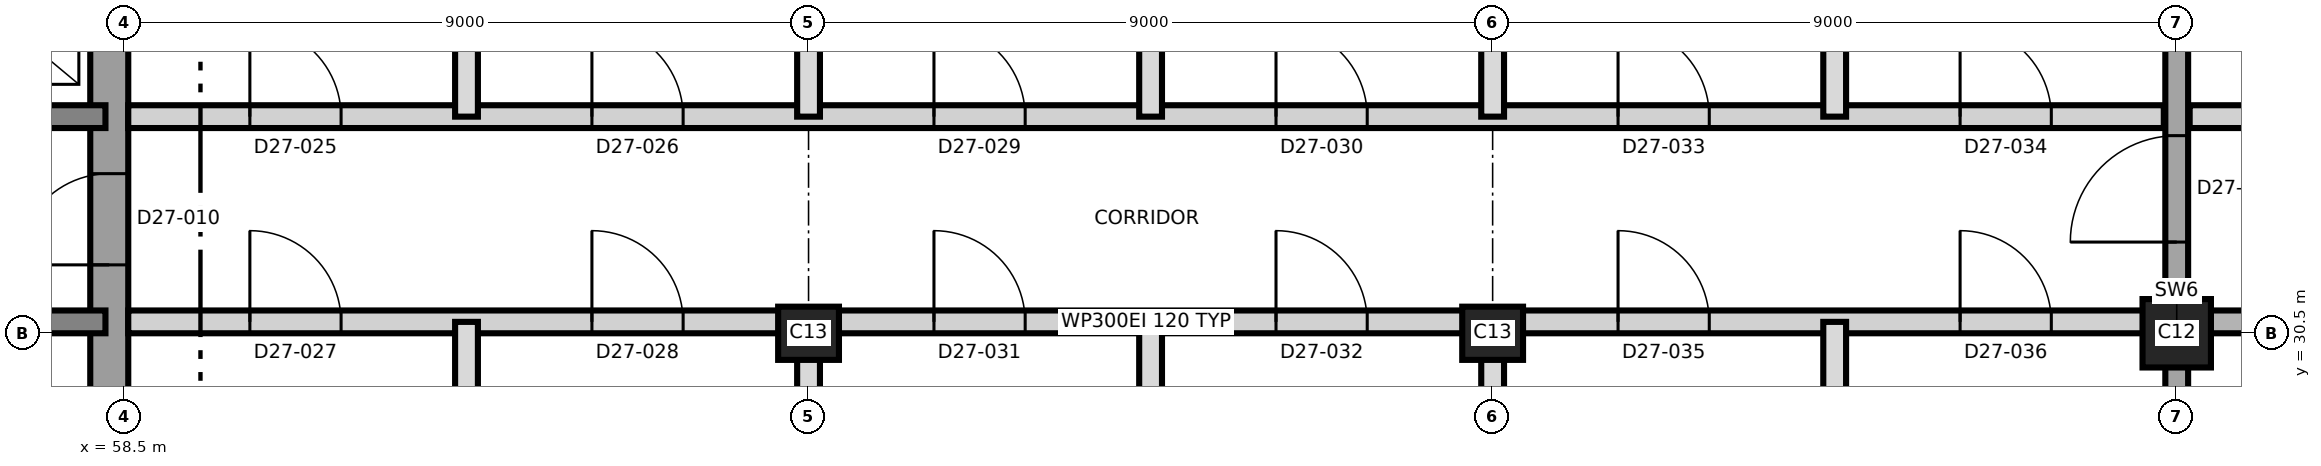
"""IFC4 building model, lengths in metres.
Left out: names, types, materials, properties, quantities, classifications, styles, units other than length and angle.
Written with IfcOpenShell. Run it as: python <this file> out.ifc"""

import sys

from ifc_helpers import new_model, si_unit, direction, frame, frame_2d, origin, origin_2d, place, context, subcontext, project, spatial, rectangle, extrude, element, fill, save


model = new_model("IFC4")
c1 = context("Model", 3, precision=1e-05, world=origin(), true_north=direction((0.0, 1.0)))
c2 = subcontext(c1, "Body", "Model", "MODEL_VIEW")
j1 = project(units=[si_unit("LENGTHUNIT", "METRE"), si_unit("PLANEANGLEUNIT", "RADIAN")], contexts=[c1])
p1 = place(None, origin())
s1 = spatial("IfcSite", under=j1, at=p1, CompositionType="ELEMENT")
p2 = place(p1, origin())
s2 = spatial("IfcBuilding", under=s1, at=p2, CompositionType="ELEMENT")
p3 = place(p2, frame((0.0, 0.0, 243.9)))
s3 = spatial("IfcBuildingStorey", under=s2, at=p3, CompositionType="ELEMENT", Elevation=243.9)
p4 = place(p3, frame((58.3, 21.25, 0.0), z_axis=(0.0, 0.0, 1.0), x_axis=(0.0, 1.0, 0.0)))
e1 = element("IfcWall", 1, at=p4, inside=s3, PredefinedType="SHEAR", context=c2, shape_type="SweptSolid", body=[
    extrude(rectangle(XDim=18.5, YDim=0.5, at=frame_2d((9.25, 0.0))), origin(), (0.0, 0.0, 1.0), 5.5),
])
p5 = place(p4, frame((10.15, 0.0, 0.0)))
e2 = element("IfcOpeningElement", 2, at=p5, cuts=e1, PredefinedType="OPENING", context=c2, shape_type="SweptSolid", body=[
    extrude(rectangle(XDim=1.2, YDim=2.1, at=frame_2d((0.6, 1.05))), frame((0.0, 0.26, 0.0), z_axis=(0.0, -1.0, 0.0), x_axis=(1.0, 0.0, 0.0)), (0.0, 0.0, 1.0), 0.52),
])
p6 = place(p3, frame((31.75, 30.65, 0.0), z_axis=(0.0, 0.0, 1.0), x_axis=(1.0, 0.0, 0.0)))
e3 = element("IfcWall", 3, at=p6, inside=s3, PredefinedType="SHEAR", context=c2, shape_type="SweptSolid", body=[
    extrude(rectangle(XDim=26.5, YDim=0.3, at=frame_2d((13.25, 0.0))), origin(), (0.0, 0.0, 1.0), 5.5),
])
p7 = place(p6, frame((24.75, 0.0, 0.0)))
e4 = element("IfcOpeningElement", 4, at=p7, cuts=e3, PredefinedType="OPENING", context=c2, shape_type="SweptSolid", body=[
    extrude(rectangle(XDim=1.0, YDim=2.1, at=frame_2d((0.5, 1.05))), frame((0.0, 0.16, 0.0), z_axis=(0.0, -1.0, 0.0), x_axis=(1.0, 0.0, 0.0)), (0.0, 0.0, 1.0), 0.32),
])
p8 = place(p3, frame((31.75, 33.35, 0.0), z_axis=(0.0, 0.0, 1.0), x_axis=(1.0, 0.0, 0.0)))
e5 = element("IfcWall", 5, at=p8, inside=s3, PredefinedType="SHEAR", context=c2, shape_type="SweptSolid", body=[
    extrude(rectangle(XDim=26.5, YDim=0.3, at=frame_2d((13.25, 0.0))), origin(), (0.0, 0.0, 1.0), 5.5),
])
p9 = place(p8, frame((13.9, 0.0, 0.0)))
e6 = element("IfcOpeningElement", 6, at=p9, cuts=e5, PredefinedType="OPENING", context=c2, shape_type="SweptSolid", body=[
    extrude(rectangle(XDim=1.4, YDim=2.1, at=frame_2d((0.7, 1.05))), frame((0.0, 0.16, 0.0), z_axis=(0.0, -1.0, 0.0), x_axis=(1.0, 0.0, 0.0)), (0.0, 0.0, 1.0), 0.32),
])
p10 = place(p8, frame((5.375, 0.0, 0.0)))
e7 = element("IfcOpeningElement", 7, at=p10, cuts=e5, PredefinedType="OPENING", context=c2, shape_type="SweptSolid", body=[
    extrude(rectangle(XDim=1.2, YDim=2.1, at=frame_2d((0.6, 1.05))), frame((0.0, 0.16, 0.0), z_axis=(0.0, -1.0, 0.0), x_axis=(1.0, 0.0, 0.0)), (0.0, 0.0, 1.0), 0.32),
])
p11 = place(p8, frame((19.925, 0.0, 0.0)))
e8 = element("IfcOpeningElement", 8, at=p11, cuts=e5, PredefinedType="OPENING", context=c2, shape_type="SweptSolid", body=[
    extrude(rectangle(XDim=1.2, YDim=2.1, at=frame_2d((0.6, 1.05))), frame((0.0, 0.16, 0.0), z_axis=(0.0, -1.0, 0.0), x_axis=(1.0, 0.0, 0.0)), (0.0, 0.0, 1.0), 0.32),
])
for number, where, z_axis, x_axis in (
    (9, (67.5, 30.5, 0.0), (0.0, 0.0, 1.0), (1.0, 0.0, 0.0)),
    (10, (76.5, 30.5, 0.0), (0.0, 0.0, 1.0), (1.0, 0.0, 0.0)),
):
    element("IfcColumn", number, at=place(p3, frame(where, z_axis=z_axis, x_axis=x_axis)), inside=s3, PredefinedType="COLUMN", context=c2, shape_type="SweptSolid", body=[
        extrude(rectangle(XDim=0.8, YDim=0.7, at=origin_2d()), origin(), (0.0, 0.0, 1.0), 5.5),
    ])
p12 = place(p3, frame((85.5, 30.5, 0.0), z_axis=(0.0, 0.0, 1.0), x_axis=(1.0, 0.0, 0.0)))
e11 = element("IfcColumn", 11, at=p12, inside=s3, PredefinedType="COLUMN", context=c2, shape_type="SweptSolid", body=[
    extrude(rectangle(XDim=0.9, YDim=0.9, at=origin_2d()), origin(), (0.0, 0.0, 1.0), 5.5),
])
p13 = place(p3, frame((85.5, 20.35, 0.0), z_axis=(0.0, 0.0, 1.0), x_axis=(0.0, 1.0, 0.0)))
e12 = element("IfcWall", 12, at=p13, inside=s3, PredefinedType="SHEAR", context=c2, shape_type="SweptSolid", body=[
    extrude(rectangle(XDim=20.3, YDim=0.3, at=frame_2d((10.15, 0.0))), origin(), (0.0, 0.0, 1.0), 5.5),
])
p14 = place(p13, frame((11.35, 0.0, 0.0)))
e13 = element("IfcOpeningElement", 13, at=p14, cuts=e12, PredefinedType="OPENING", context=c2, shape_type="SweptSolid", body=[
    extrude(rectangle(XDim=1.4, YDim=2.1, at=frame_2d((0.7, 1.05))), frame((0.0, 0.16, 0.0), z_axis=(0.0, -1.0, 0.0), x_axis=(1.0, 0.0, 0.0)), (0.0, 0.0, 1.0), 0.32),
])
p15 = place(p3, frame((58.55, 30.65, 0.0), z_axis=(0.0, 0.0, 1.0), x_axis=(1.0, 0.0, 0.0)))
e14 = element("IfcWall", 14, at=p15, inside=s3, PredefinedType="PARTITIONING", context=c2, shape_type="SweptSolid", body=[
    extrude(rectangle(XDim=26.78, YDim=0.3, at=frame_2d((13.39, 0.0))), origin(), (0.0, 0.0, 1.0), 5.2),
])
p16 = place(p15, frame((1.6, 0.0, 0.0)))
e15 = element("IfcOpeningElement", 15, at=p16, cuts=e14, PredefinedType="OPENING", context=c2, shape_type="SweptSolid", body=[
    extrude(rectangle(XDim=1.2, YDim=2.1, at=frame_2d((0.6, 1.05))), frame((0.0, 0.16, 0.0), z_axis=(0.0, -1.0, 0.0), x_axis=(1.0, 0.0, 0.0)), (0.0, 0.0, 1.0), 0.32),
])
p17 = place(p15, frame((6.1, 0.0, 0.0)))
e16 = element("IfcOpeningElement", 16, at=p17, cuts=e14, PredefinedType="OPENING", context=c2, shape_type="SweptSolid", body=[
    extrude(rectangle(XDim=1.2, YDim=2.1, at=frame_2d((0.6, 1.05))), frame((0.0, 0.16, 0.0), z_axis=(0.0, -1.0, 0.0), x_axis=(1.0, 0.0, 0.0)), (0.0, 0.0, 1.0), 0.32),
])
p18 = place(p15, frame((10.6, 0.0, 0.0)))
e17 = element("IfcOpeningElement", 17, at=p18, cuts=e14, PredefinedType="OPENING", context=c2, shape_type="SweptSolid", body=[
    extrude(rectangle(XDim=1.2, YDim=2.1, at=frame_2d((0.6, 1.05))), frame((0.0, 0.16, 0.0), z_axis=(0.0, -1.0, 0.0), x_axis=(1.0, 0.0, 0.0)), (0.0, 0.0, 1.0), 0.32),
])
p19 = place(p15, frame((15.1, 0.0, 0.0)))
e18 = element("IfcOpeningElement", 18, at=p19, cuts=e14, PredefinedType="OPENING", context=c2, shape_type="SweptSolid", body=[
    extrude(rectangle(XDim=1.2, YDim=2.1, at=frame_2d((0.6, 1.05))), frame((0.0, 0.16, 0.0), z_axis=(0.0, -1.0, 0.0), x_axis=(1.0, 0.0, 0.0)), (0.0, 0.0, 1.0), 0.32),
])
p20 = place(p15, frame((19.6, 0.0, 0.0)))
e19 = element("IfcOpeningElement", 19, at=p20, cuts=e14, PredefinedType="OPENING", context=c2, shape_type="SweptSolid", body=[
    extrude(rectangle(XDim=1.2, YDim=2.1, at=frame_2d((0.6, 1.05))), frame((0.0, 0.16, 0.0), z_axis=(0.0, -1.0, 0.0), x_axis=(1.0, 0.0, 0.0)), (0.0, 0.0, 1.0), 0.32),
])
p21 = place(p15, frame((24.1, 0.0, 0.0)))
e20 = element("IfcOpeningElement", 20, at=p21, cuts=e14, PredefinedType="OPENING", context=c2, shape_type="SweptSolid", body=[
    extrude(rectangle(XDim=1.2, YDim=2.1, at=frame_2d((0.6, 1.05))), frame((0.0, 0.16, 0.0), z_axis=(0.0, -1.0, 0.0), x_axis=(1.0, 0.0, 0.0)), (0.0, 0.0, 1.0), 0.32),
])
p22 = place(p3, frame((85.67, 30.65, 0.0), z_axis=(0.0, 0.0, 1.0), x_axis=(1.0, 0.0, 0.0)))
e21 = element("IfcWall", 21, at=p22, inside=s3, PredefinedType="SHEAR", context=c2, shape_type="SweptSolid", body=[
    extrude(rectangle(XDim=9.58, YDim=0.3, at=frame_2d((4.79, 0.0))), origin(), (0.0, 0.0, 1.0), 5.2),
])
p23 = place(p22, frame((2.08, 0.0, 0.0)))
e22 = element("IfcOpeningElement", 22, at=p23, cuts=e21, PredefinedType="OPENING", context=c2, shape_type="SweptSolid", body=[
    extrude(rectangle(XDim=1.2, YDim=2.1, at=frame_2d((0.6, 1.05))), frame((0.0, 0.16, 0.0), z_axis=(0.0, -1.0, 0.0), x_axis=(1.0, 0.0, 0.0)), (0.0, 0.0, 1.0), 0.32),
])
p24 = place(p22, frame((5.63, 0.0, 0.0)))
e23 = element("IfcOpeningElement", 23, at=p24, cuts=e21, PredefinedType="OPENING", context=c2, shape_type="SweptSolid", body=[
    extrude(rectangle(XDim=1.0, YDim=2.1, at=frame_2d((0.5, 1.05))), frame((0.0, 0.16, 0.0), z_axis=(0.0, -1.0, 0.0), x_axis=(1.0, 0.0, 0.0)), (0.0, 0.0, 1.0), 0.32),
])
p25 = place(p3, frame((58.55, 33.35, 0.0), z_axis=(0.0, 0.0, 1.0), x_axis=(1.0, 0.0, 0.0)))
e24 = element("IfcWall", 24, at=p25, inside=s3, PredefinedType="PARTITIONING", context=c2, shape_type="SweptSolid", body=[
    extrude(rectangle(XDim=26.78, YDim=0.3, at=frame_2d((13.39, 0.0))), origin(), (0.0, 0.0, 1.0), 5.2),
])
p26 = place(p25, frame((1.6, 0.0, 0.0)))
e25 = element("IfcOpeningElement", 25, at=p26, cuts=e24, PredefinedType="OPENING", context=c2, shape_type="SweptSolid", body=[
    extrude(rectangle(XDim=1.2, YDim=2.1, at=frame_2d((0.6, 1.05))), frame((0.0, 0.16, 0.0), z_axis=(0.0, -1.0, 0.0), x_axis=(1.0, 0.0, 0.0)), (0.0, 0.0, 1.0), 0.32),
])
p27 = place(p25, frame((6.1, 0.0, 0.0)))
e26 = element("IfcOpeningElement", 26, at=p27, cuts=e24, PredefinedType="OPENING", context=c2, shape_type="SweptSolid", body=[
    extrude(rectangle(XDim=1.2, YDim=2.1, at=frame_2d((0.6, 1.05))), frame((0.0, 0.16, 0.0), z_axis=(0.0, -1.0, 0.0), x_axis=(1.0, 0.0, 0.0)), (0.0, 0.0, 1.0), 0.32),
])
p28 = place(p25, frame((10.6, 0.0, 0.0)))
e27 = element("IfcOpeningElement", 27, at=p28, cuts=e24, PredefinedType="OPENING", context=c2, shape_type="SweptSolid", body=[
    extrude(rectangle(XDim=1.2, YDim=2.1, at=frame_2d((0.6, 1.05))), frame((0.0, 0.16, 0.0), z_axis=(0.0, -1.0, 0.0), x_axis=(1.0, 0.0, 0.0)), (0.0, 0.0, 1.0), 0.32),
])
p29 = place(p25, frame((15.1, 0.0, 0.0)))
e28 = element("IfcOpeningElement", 28, at=p29, cuts=e24, PredefinedType="OPENING", context=c2, shape_type="SweptSolid", body=[
    extrude(rectangle(XDim=1.2, YDim=2.1, at=frame_2d((0.6, 1.05))), frame((0.0, 0.16, 0.0), z_axis=(0.0, -1.0, 0.0), x_axis=(1.0, 0.0, 0.0)), (0.0, 0.0, 1.0), 0.32),
])
p30 = place(p25, frame((19.6, 0.0, 0.0)))
e29 = element("IfcOpeningElement", 29, at=p30, cuts=e24, PredefinedType="OPENING", context=c2, shape_type="SweptSolid", body=[
    extrude(rectangle(XDim=1.2, YDim=2.1, at=frame_2d((0.6, 1.05))), frame((0.0, 0.16, 0.0), z_axis=(0.0, -1.0, 0.0), x_axis=(1.0, 0.0, 0.0)), (0.0, 0.0, 1.0), 0.32),
])
p31 = place(p25, frame((24.1, 0.0, 0.0)))
e30 = element("IfcOpeningElement", 30, at=p31, cuts=e24, PredefinedType="OPENING", context=c2, shape_type="SweptSolid", body=[
    extrude(rectangle(XDim=1.2, YDim=2.1, at=frame_2d((0.6, 1.05))), frame((0.0, 0.16, 0.0), z_axis=(0.0, -1.0, 0.0), x_axis=(1.0, 0.0, 0.0)), (0.0, 0.0, 1.0), 0.32),
])
p32 = place(p3, frame((85.67, 33.35, 0.0), z_axis=(0.0, 0.0, 1.0), x_axis=(1.0, 0.0, 0.0)))
e31 = element("IfcWall", 31, at=p32, inside=s3, PredefinedType="PARTITIONING", context=c2, shape_type="SweptSolid", body=[
    extrude(rectangle(XDim=9.705, YDim=0.3, at=frame_2d((4.853, 0.0))), origin(), (0.0, 0.0, 1.0), 5.2),
])
p33 = place(p32, frame((2.73, 0.0, 0.0)))
e32 = element("IfcOpeningElement", 32, at=p33, cuts=e31, PredefinedType="OPENING", context=c2, shape_type="SweptSolid", body=[
    extrude(rectangle(XDim=1.2, YDim=2.1, at=frame_2d((0.6, 1.05))), frame((0.0, 0.16, 0.0), z_axis=(0.0, -1.0, 0.0), x_axis=(1.0, 0.0, 0.0)), (0.0, 0.0, 1.0), 0.32),
])
p34 = place(p3, frame((63.0, 21.9, 0.0), z_axis=(0.0, 0.0, 1.0), x_axis=(0.0, 1.0, 0.0)))
e33 = element("IfcWall", 33, at=p34, inside=s3, PredefinedType="PARTITIONING", context=c2, shape_type="SweptSolid", body=[
    extrude(rectangle(XDim=8.75, YDim=0.3, at=frame_2d((4.375, 0.0))), origin(), (0.0, 0.0, 1.0), 5.2),
])
p35 = place(p3, frame((63.0, 33.35, 0.0), z_axis=(0.0, 0.0, 1.0), x_axis=(0.0, 1.0, 0.0)))
e34 = element("IfcWall", 34, at=p35, inside=s3, PredefinedType="PARTITIONING", context=c2, shape_type="SweptSolid", body=[
    extrude(rectangle(XDim=5.75, YDim=0.3, at=frame_2d((2.875, 0.0))), origin(), (0.0, 0.0, 1.0), 5.2),
])
p36 = place(p3, frame((67.5, 21.9, 0.0), z_axis=(0.0, 0.0, 1.0), x_axis=(0.0, 1.0, 0.0)))
e35 = element("IfcWall", 35, at=p36, inside=s3, PredefinedType="PARTITIONING", context=c2, shape_type="SweptSolid", body=[
    extrude(rectangle(XDim=8.75, YDim=0.3, at=frame_2d((4.375, 0.0))), origin(), (0.0, 0.0, 1.0), 5.2),
])
p37 = place(p3, frame((67.5, 33.35, 0.0), z_axis=(0.0, 0.0, 1.0), x_axis=(0.0, 1.0, 0.0)))
e36 = element("IfcWall", 36, at=p37, inside=s3, PredefinedType="PARTITIONING", context=c2, shape_type="SweptSolid", body=[
    extrude(rectangle(XDim=5.75, YDim=0.3, at=frame_2d((2.875, 0.0))), origin(), (0.0, 0.0, 1.0), 5.2),
])
p38 = place(p3, frame((72.0, 21.9, 0.0), z_axis=(0.0, 0.0, 1.0), x_axis=(0.0, 1.0, 0.0)))
e37 = element("IfcWall", 37, at=p38, inside=s3, PredefinedType="PARTITIONING", context=c2, shape_type="SweptSolid", body=[
    extrude(rectangle(XDim=8.75, YDim=0.3, at=frame_2d((4.375, 0.0))), origin(), (0.0, 0.0, 1.0), 5.2),
])
p39 = place(p3, frame((72.0, 33.35, 0.0), z_axis=(0.0, 0.0, 1.0), x_axis=(0.0, 1.0, 0.0)))
e38 = element("IfcWall", 38, at=p39, inside=s3, PredefinedType="PARTITIONING", context=c2, shape_type="SweptSolid", body=[
    extrude(rectangle(XDim=5.75, YDim=0.3, at=frame_2d((2.875, 0.0))), origin(), (0.0, 0.0, 1.0), 5.2),
])
p40 = place(p3, frame((76.5, 21.9, 0.0), z_axis=(0.0, 0.0, 1.0), x_axis=(0.0, 1.0, 0.0)))
e39 = element("IfcWall", 39, at=p40, inside=s3, PredefinedType="PARTITIONING", context=c2, shape_type="SweptSolid", body=[
    extrude(rectangle(XDim=8.75, YDim=0.3, at=frame_2d((4.375, 0.0))), origin(), (0.0, 0.0, 1.0), 5.2),
])
p41 = place(p3, frame((76.5, 33.35, 0.0), z_axis=(0.0, 0.0, 1.0), x_axis=(0.0, 1.0, 0.0)))
e40 = element("IfcWall", 40, at=p41, inside=s3, PredefinedType="PARTITIONING", context=c2, shape_type="SweptSolid", body=[
    extrude(rectangle(XDim=5.75, YDim=0.3, at=frame_2d((2.875, 0.0))), origin(), (0.0, 0.0, 1.0), 5.2),
])
p42 = place(p3, frame((81.0, 21.9, 0.0), z_axis=(0.0, 0.0, 1.0), x_axis=(0.0, 1.0, 0.0)))
e41 = element("IfcWall", 41, at=p42, inside=s3, PredefinedType="PARTITIONING", context=c2, shape_type="SweptSolid", body=[
    extrude(rectangle(XDim=8.75, YDim=0.3, at=frame_2d((4.375, 0.0))), origin(), (0.0, 0.0, 1.0), 5.2),
])
p43 = place(p3, frame((81.0, 33.35, 0.0), z_axis=(0.0, 0.0, 1.0), x_axis=(0.0, 1.0, 0.0)))
e42 = element("IfcWall", 42, at=p43, inside=s3, PredefinedType="PARTITIONING", context=c2, shape_type="SweptSolid", body=[
    extrude(rectangle(XDim=5.75, YDim=0.3, at=frame_2d((2.875, 0.0))), origin(), (0.0, 0.0, 1.0), 5.2),
])
p44 = place(p5, origin())
e43 = element("IfcDoor", 43, at=p44, inside=s3, OperationType="SINGLE_SWING_LEFT", PredefinedType="DOOR", context=c2, shape_type="SweptSolid", body=[
    extrude(rectangle(XDim=1.2, YDim=2.1, at=frame_2d((0.6, 1.05))), frame((0.0, 0.025, 0.0), z_axis=(0.0, -1.0, 0.0), x_axis=(1.0, 0.0, 0.0)), (0.0, 0.0, 1.0), 0.05),
])
fill(e2, e43)
p45 = place(p26, origin())
e44 = element("IfcDoor", 44, at=p45, inside=s3, OperationType="SINGLE_SWING_LEFT", PredefinedType="DOOR", context=c2, shape_type="SweptSolid", body=[
    extrude(rectangle(XDim=1.2, YDim=2.1, at=frame_2d((0.6, 1.05))), frame((0.0, 0.025, 0.0), z_axis=(0.0, -1.0, 0.0), x_axis=(1.0, 0.0, 0.0)), (0.0, 0.0, 1.0), 0.05),
])
fill(e25, e44)
p46 = place(p27, origin())
e45 = element("IfcDoor", 45, at=p46, inside=s3, OperationType="SINGLE_SWING_LEFT", PredefinedType="DOOR", context=c2, shape_type="SweptSolid", body=[
    extrude(rectangle(XDim=1.2, YDim=2.1, at=frame_2d((0.6, 1.05))), frame((0.0, 0.025, 0.0), z_axis=(0.0, -1.0, 0.0), x_axis=(1.0, 0.0, 0.0)), (0.0, 0.0, 1.0), 0.05),
])
fill(e26, e45)
p47 = place(p16, origin())
e46 = element("IfcDoor", 46, at=p47, inside=s3, OperationType="SINGLE_SWING_RIGHT", PredefinedType="DOOR", context=c2, shape_type="SweptSolid", body=[
    extrude(rectangle(XDim=1.2, YDim=2.1, at=frame_2d((0.6, 1.05))), frame((0.0, 0.025, 0.0), z_axis=(0.0, -1.0, 0.0), x_axis=(1.0, 0.0, 0.0)), (0.0, 0.0, 1.0), 0.05),
])
fill(e15, e46)
p48 = place(p17, origin())
e47 = element("IfcDoor", 47, at=p48, inside=s3, OperationType="SINGLE_SWING_LEFT", PredefinedType="DOOR", context=c2, shape_type="SweptSolid", body=[
    extrude(rectangle(XDim=1.2, YDim=2.1, at=frame_2d((0.6, 1.05))), frame((0.0, 0.025, 0.0), z_axis=(0.0, -1.0, 0.0), x_axis=(1.0, 0.0, 0.0)), (0.0, 0.0, 1.0), 0.05),
])
fill(e16, e47)
p49 = place(p28, origin())
e48 = element("IfcDoor", 48, at=p49, inside=s3, OperationType="SINGLE_SWING_LEFT", PredefinedType="DOOR", context=c2, shape_type="SweptSolid", body=[
    extrude(rectangle(XDim=1.2, YDim=2.1, at=frame_2d((0.6, 1.05))), frame((0.0, 0.025, 0.0), z_axis=(0.0, -1.0, 0.0), x_axis=(1.0, 0.0, 0.0)), (0.0, 0.0, 1.0), 0.05),
])
fill(e27, e48)
p50 = place(p29, origin())
e49 = element("IfcDoor", 49, at=p50, inside=s3, OperationType="SINGLE_SWING_RIGHT", PredefinedType="DOOR", context=c2, shape_type="SweptSolid", body=[
    extrude(rectangle(XDim=1.2, YDim=2.1, at=frame_2d((0.6, 1.05))), frame((0.0, 0.025, 0.0), z_axis=(0.0, -1.0, 0.0), x_axis=(1.0, 0.0, 0.0)), (0.0, 0.0, 1.0), 0.05),
])
fill(e28, e49)
p51 = place(p18, origin())
e50 = element("IfcDoor", 50, at=p51, inside=s3, OperationType="SINGLE_SWING_LEFT", PredefinedType="DOOR", context=c2, shape_type="SweptSolid", body=[
    extrude(rectangle(XDim=1.2, YDim=2.1, at=frame_2d((0.6, 1.05))), frame((0.0, 0.025, 0.0), z_axis=(0.0, -1.0, 0.0), x_axis=(1.0, 0.0, 0.0)), (0.0, 0.0, 1.0), 0.05),
])
fill(e17, e50)
p52 = place(p19, origin())
e51 = element("IfcDoor", 51, at=p52, inside=s3, OperationType="SINGLE_SWING_LEFT", PredefinedType="DOOR", context=c2, shape_type="SweptSolid", body=[
    extrude(rectangle(XDim=1.2, YDim=2.1, at=frame_2d((0.6, 1.05))), frame((0.0, 0.025, 0.0), z_axis=(0.0, -1.0, 0.0), x_axis=(1.0, 0.0, 0.0)), (0.0, 0.0, 1.0), 0.05),
])
fill(e18, e51)
p53 = place(p30, origin())
e52 = element("IfcDoor", 52, at=p53, inside=s3, OperationType="SINGLE_SWING_RIGHT", PredefinedType="DOOR", context=c2, shape_type="SweptSolid", body=[
    extrude(rectangle(XDim=1.2, YDim=2.1, at=frame_2d((0.6, 1.05))), frame((0.0, 0.025, 0.0), z_axis=(0.0, -1.0, 0.0), x_axis=(1.0, 0.0, 0.0)), (0.0, 0.0, 1.0), 0.05),
])
fill(e29, e52)
p54 = place(p31, origin())
e53 = element("IfcDoor", 53, at=p54, inside=s3, OperationType="SINGLE_SWING_LEFT", PredefinedType="DOOR", context=c2, shape_type="SweptSolid", body=[
    extrude(rectangle(XDim=1.2, YDim=2.1, at=frame_2d((0.6, 1.05))), frame((0.0, 0.025, 0.0), z_axis=(0.0, -1.0, 0.0), x_axis=(1.0, 0.0, 0.0)), (0.0, 0.0, 1.0), 0.05),
])
fill(e30, e53)
p55 = place(p20, origin())
e54 = element("IfcDoor", 54, at=p55, inside=s3, OperationType="SINGLE_SWING_LEFT", PredefinedType="DOOR", context=c2, shape_type="SweptSolid", body=[
    extrude(rectangle(XDim=1.2, YDim=2.1, at=frame_2d((0.6, 1.05))), frame((0.0, 0.025, 0.0), z_axis=(0.0, -1.0, 0.0), x_axis=(1.0, 0.0, 0.0)), (0.0, 0.0, 1.0), 0.05),
])
fill(e19, e54)
p56 = place(p21, origin())
e55 = element("IfcDoor", 55, at=p56, inside=s3, OperationType="SINGLE_SWING_RIGHT", PredefinedType="DOOR", context=c2, shape_type="SweptSolid", body=[
    extrude(rectangle(XDim=1.2, YDim=2.1, at=frame_2d((0.6, 1.05))), frame((0.0, 0.025, 0.0), z_axis=(0.0, -1.0, 0.0), x_axis=(1.0, 0.0, 0.0)), (0.0, 0.0, 1.0), 0.05),
])
fill(e20, e55)
p57 = place(p14, origin())
e56 = element("IfcDoor", 56, at=p57, inside=s3, OperationType="SINGLE_SWING_RIGHT", PredefinedType="DOOR", context=c2, shape_type="SweptSolid", body=[
    extrude(rectangle(XDim=1.4, YDim=2.1, at=frame_2d((0.7, 1.05))), frame((0.0, 0.025, 0.0), z_axis=(0.0, -1.0, 0.0), x_axis=(1.0, 0.0, 0.0)), (0.0, 0.0, 1.0), 0.05),
])
fill(e13, e56)
save(model, sys.argv[1])
